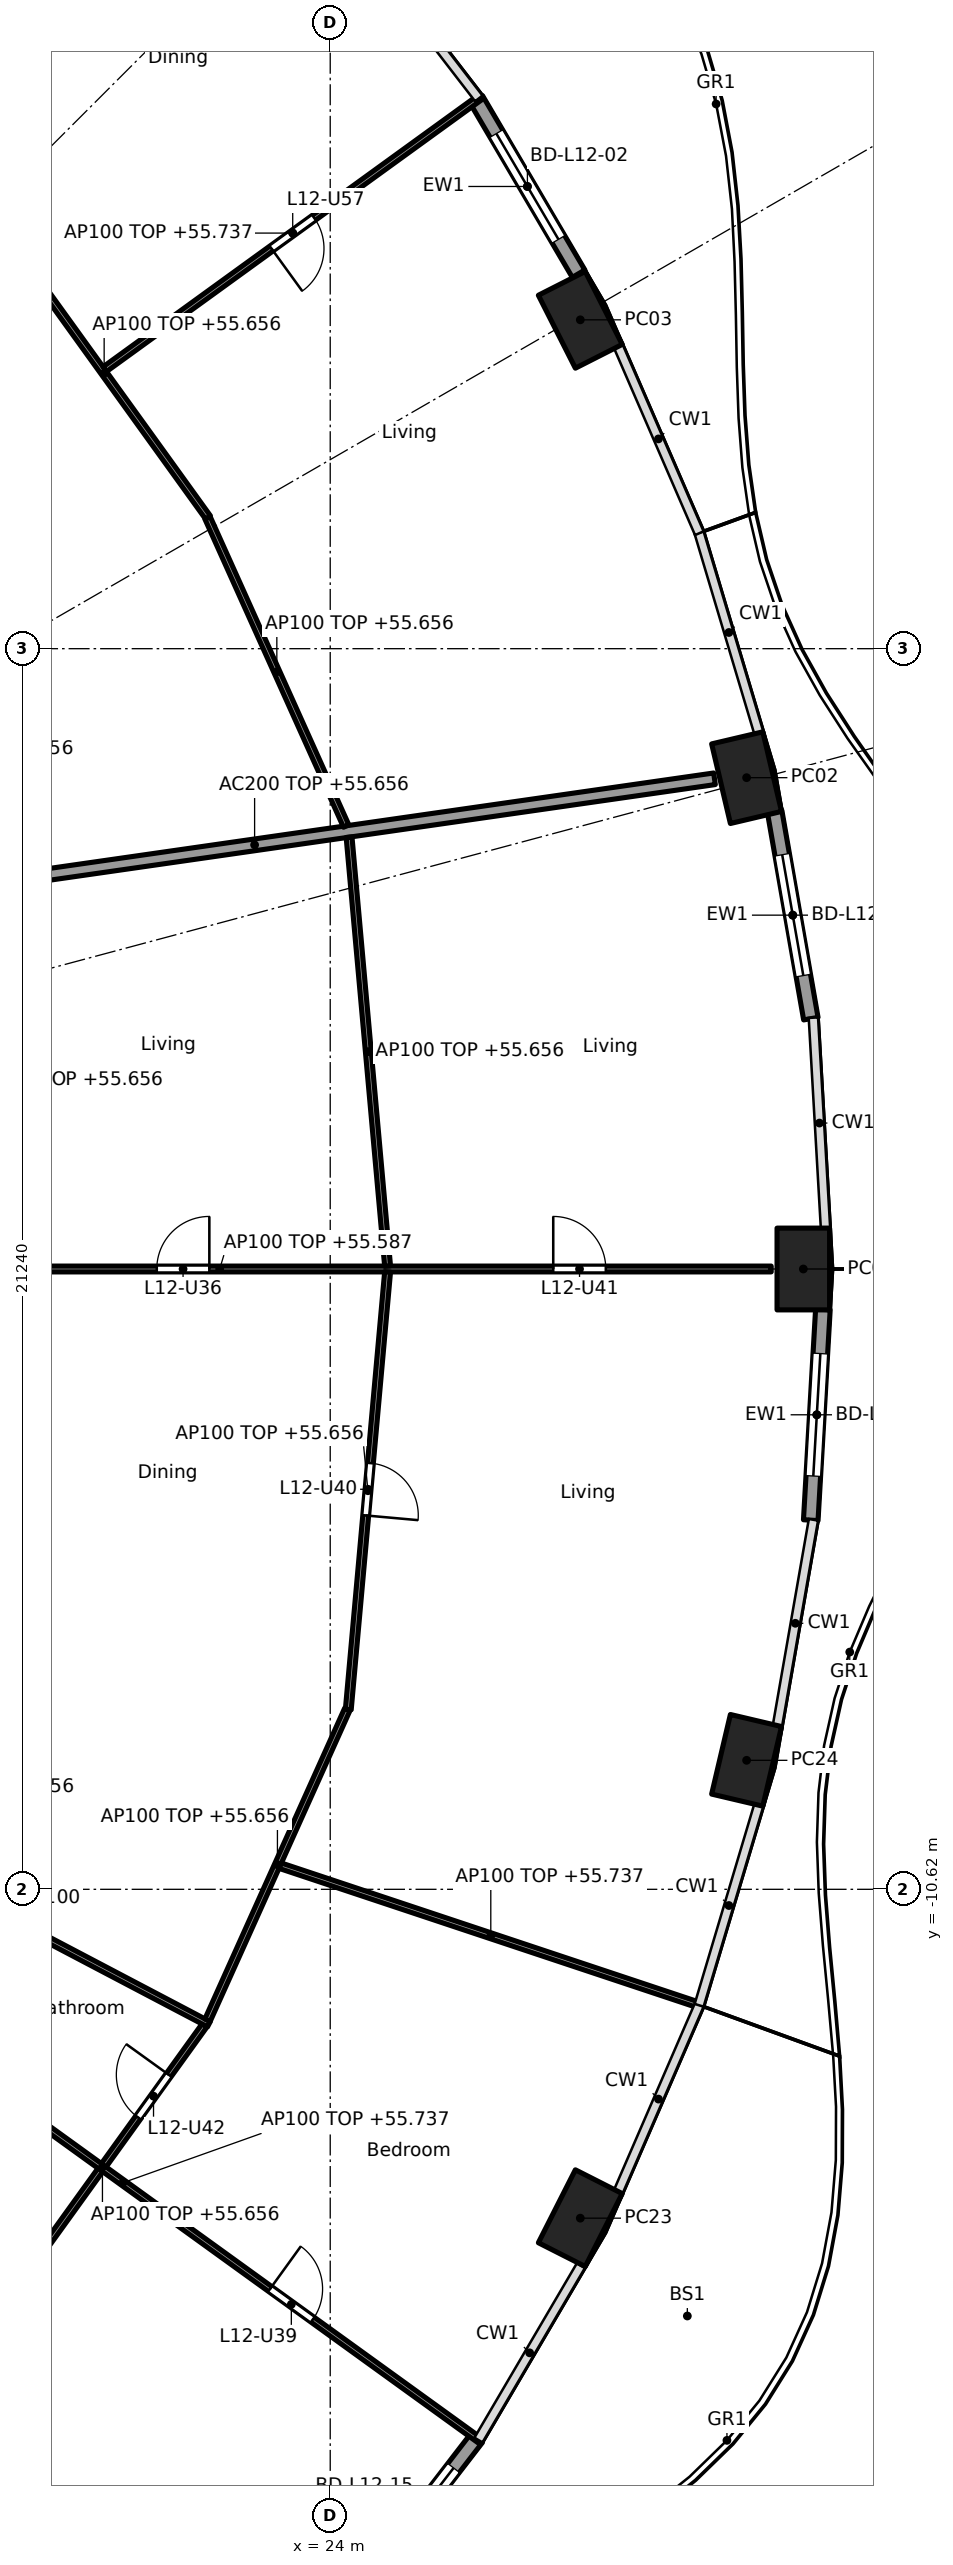
"""IFC4 building model, lengths in metres.
Left out: names, types, materials, properties, quantities, classifications, styles, units other than length and angle.
Written with IfcOpenShell. Run it as: python <this file> out.ifc"""

import sys

from ifc_helpers import new_model, si_unit, direction, frame, frame_2d, origin, origin_2d, place, context, subcontext, project, spatial, rectangle, hollow_rectangle, extrude, element, fill, save


model = new_model("IFC4")
c1 = context("Model", 3, precision=1e-05, world=origin(), true_north=direction((0.0, 1.0)))
c2 = subcontext(c1, "Body", "Model", "MODEL_VIEW")
j1 = project(units=[si_unit("LENGTHUNIT", "METRE"), si_unit("PLANEANGLEUNIT", "RADIAN")], contexts=[c1])
p1 = place(None, origin())
s1 = spatial("IfcSite", under=j1, at=p1, CompositionType="ELEMENT")
p2 = place(p1, origin())
s2 = spatial("IfcBuilding", under=s1, at=p2, CompositionType="ELEMENT")
p3 = place(p2, frame((0.0, 0.0, 52.9)))
s3 = spatial("IfcBuildingStorey", under=s2, at=p3, CompositionType="ELEMENT", Elevation=52.9)
for number, where, z_axis, x_axis in (
    (1, (32.1, 0.0, 0.0), (0.0, 0.0, 1.0), (0.0, 1.0, 0.0)),
    (2, (31.129, 8.412, 0.0), (0.0, 0.0, 1.0), (-0.229, 0.973, 0.0)),
    (3, (28.282, 16.25, 0.0), (0.0, 0.0, 1.0), (-0.452, 0.892, 0.0)),
    (4, (28.282, -16.25, 0.0), (0.0, 0.0, 1.0), (0.452, 0.892, 0.0)),
    (5, (31.129, -8.412, 0.0), (0.0, 0.0, 1.0), (0.229, 0.973, 0.0)),
):
    element("IfcColumn", number, at=place(p3, frame(where, z_axis=z_axis, x_axis=x_axis)), inside=s3, PredefinedType="COLUMN", context=c2, shape_type="SweptSolid", body=[
        extrude(hollow_rectangle(XDim=1.4, YDim=0.9, WallThickness=0.05, at=origin_2d()), origin(), (0.0, 0.0, 1.0), 3.7),
    ])
p4 = place(p3, frame((31.609, 7.83, 0.0), z_axis=(0.0, 0.0, 1.0), x_axis=(0.172217377323, -0.98505897029, 0.0)))
e6 = element("IfcWall", 6, at=p4, inside=s3, PredefinedType="SOLIDWALL", context=c2, shape_type="SweptSolid", body=[
    extrude(rectangle(XDim=3.598, YDim=0.25, at=frame_2d((1.799, 0.0))), origin(), (0.0, 0.0, 1.0), 3.44),
])
p5 = place(p4, frame((0.749, 0.0, 0.0)))
e7 = element("IfcOpeningElement", 7, at=p5, cuts=e6, PredefinedType="OPENING", context=c2, shape_type="SweptSolid", body=[
    extrude(rectangle(XDim=2.1, YDim=2.4, at=frame_2d((1.05, 1.2))), frame((0.0, 0.135, 0.0), z_axis=(0.0, -1.0, 0.0), x_axis=(1.0, 0.0, 0.0)), (0.0, 0.0, 1.0), 0.27),
])
p6 = place(p3, frame((26.5, 20.026, 0.0), z_axis=(0.0, 0.0, 1.0), x_axis=(0.506311160839, -0.862350861546, 0.0)))
e8 = element("IfcWall", 8, at=p6, inside=s3, PredefinedType="SOLIDWALL", context=c2, shape_type="SweptSolid", body=[
    extrude(rectangle(XDim=3.462, YDim=0.25, at=frame_2d((1.731, 0.0))), origin(), (0.0, 0.0, 1.0), 3.44),
])
p7 = place(p6, frame((0.681, 0.0, 0.0)))
e9 = element("IfcOpeningElement", 9, at=p7, cuts=e8, PredefinedType="OPENING", context=c2, shape_type="SweptSolid", body=[
    extrude(rectangle(XDim=2.1, YDim=2.4, at=frame_2d((1.05, 1.2))), frame((0.0, 0.135, 0.0), z_axis=(0.0, -1.0, 0.0), x_axis=(1.0, 0.0, 0.0)), (0.0, 0.0, 1.0), 0.27),
])
p8 = place(p3, frame((26.508, -20.013, 0.0), z_axis=(0.0, 0.0, 1.0), x_axis=(-0.610457147657, -0.792049285635, 0.0)))
e10 = element("IfcWall", 10, at=p8, inside=s3, PredefinedType="SOLIDWALL", context=c2, shape_type="SweptSolid", body=[
    extrude(rectangle(XDim=3.397, YDim=0.25, at=frame_2d((1.699, 0.0))), origin(), (0.0, 0.0, 1.0), 3.44),
])
p9 = place(p8, frame((0.649, 0.0, 0.0)))
e11 = element("IfcOpeningElement", 11, at=p9, cuts=e10, PredefinedType="OPENING", context=c2, shape_type="SweptSolid", body=[
    extrude(rectangle(XDim=2.1, YDim=2.4, at=frame_2d((1.05, 1.2))), frame((0.0, 0.135, 0.0), z_axis=(0.0, -1.0, 0.0), x_axis=(1.0, 0.0, 0.0)), (0.0, 0.0, 1.0), 0.27),
])
p10 = place(p3, frame((32.435, -0.692, 0.0), z_axis=(0.0, 0.0, 1.0), x_axis=(-0.057546046339, -0.998342853208, 0.0)))
e12 = element("IfcWall", 12, at=p10, inside=s3, PredefinedType="SOLIDWALL", context=c2, shape_type="SweptSolid", body=[
    extrude(rectangle(XDim=3.615, YDim=0.25, at=frame_2d((1.807, 0.0))), origin(), (0.0, 0.0, 1.0), 3.44),
])
p11 = place(p10, frame((0.757, 0.0, 0.0)))
e13 = element("IfcOpeningElement", 13, at=p11, cuts=e12, PredefinedType="OPENING", context=c2, shape_type="SweptSolid", body=[
    extrude(rectangle(XDim=2.1, YDim=2.4, at=frame_2d((1.05, 1.2))), frame((0.0, 0.135, 0.0), z_axis=(0.0, -1.0, 0.0), x_axis=(1.0, 0.0, 0.0)), (0.0, 0.0, 1.0), 0.27),
])
p12 = place(p3, frame((14.832, 6.13, 0.0), z_axis=(0.0, 0.0, 1.0), x_axis=(0.989836541293, 0.142209779978, 0.0)))
e14 = element("IfcWall", 14, at=p12, inside=s3, PredefinedType="PARTITIONING", context=c2, shape_type="SweptSolid", body=[
    extrude(rectangle(XDim=15.909, YDim=0.2, at=frame_2d((7.955, 0.0))), origin(), (0.0, 0.0, 1.0), 2.756),
])
p13 = place(p3, frame((12.665, 0.0, 0.0), z_axis=(0.0, 0.0, 1.0), x_axis=(1.0, 0.0, 0.0)))
e15 = element("IfcWall", 15, at=p13, inside=s3, PredefinedType="PARTITIONING", context=c2, shape_type="SweptSolid", body=[
    extrude(rectangle(XDim=18.885, YDim=0.1, at=frame_2d((9.443, 0.0))), origin(), (0.0, 0.0, 1.0), 2.687),
])
p14 = place(p13, frame((2.205, 0.0, 0.0)))
e16 = element("IfcOpeningElement", 16, at=p14, cuts=e15, PredefinedType="OPENING", context=c2, shape_type="SweptSolid", body=[
    extrude(rectangle(XDim=0.9, YDim=2.1, at=frame_2d((0.45, 1.05))), frame((0.0, 0.06, 0.0), z_axis=(0.0, -1.0, 0.0), x_axis=(1.0, 0.0, 0.0)), (0.0, 0.0, 1.0), 0.12),
])
p15 = place(p13, frame((8.366, 0.0, 0.0)))
e17 = element("IfcOpeningElement", 17, at=p15, cuts=e15, PredefinedType="OPENING", context=c2, shape_type="SweptSolid", body=[
    extrude(rectangle(XDim=0.9, YDim=2.1, at=frame_2d((0.45, 1.05))), frame((0.0, 0.06, 0.0), z_axis=(0.0, -1.0, 0.0), x_axis=(1.0, 0.0, 0.0)), (0.0, 0.0, 1.0), 0.12),
])
p16 = place(p13, frame((15.154, 0.0, 0.0)))
e18 = element("IfcOpeningElement", 18, at=p16, cuts=e15, PredefinedType="OPENING", context=c2, shape_type="SweptSolid", body=[
    extrude(rectangle(XDim=0.9, YDim=2.1, at=frame_2d((0.45, 1.05))), frame((0.0, 0.06, 0.0), z_axis=(0.0, -1.0, 0.0), x_axis=(1.0, 0.0, 0.0)), (0.0, 0.0, 1.0), 0.12),
])
p17 = place(p3, frame((24.982, 0.05, 0.0), z_axis=(0.0, 0.0, 1.0), x_axis=(-0.08944290521, 0.995991951126, 0.0)))
e19 = element("IfcWall", 19, at=p17, inside=s3, PredefinedType="PARTITIONING", context=c2, shape_type="SweptSolid", body=[
    extrude(rectangle(XDim=7.373, YDim=0.1, at=frame_2d((3.686, 0.0))), origin(), (0.0, 0.0, 1.0), 2.756),
])
p18 = place(p3, frame((24.982, -0.05, 0.0), z_axis=(0.0, 0.0, 1.0), x_axis=(-0.089444214321, -0.995991833563, 0.0)))
e20 = element("IfcWall", 20, at=p18, inside=s3, PredefinedType="PARTITIONING", context=c2, shape_type="SweptSolid", body=[
    extrude(rectangle(XDim=7.523, YDim=0.1, at=frame_2d((3.761, 0.0))), origin(), (0.0, 0.0, 1.0), 2.756),
])
p19 = place(p18, frame((3.286, 0.0, 0.0)))
e21 = element("IfcOpeningElement", 21, at=p19, cuts=e20, PredefinedType="OPENING", context=c2, shape_type="SweptSolid", body=[
    extrude(rectangle(XDim=0.9, YDim=2.1, at=frame_2d((0.45, 1.05))), frame((0.0, 0.06, 0.0), z_axis=(0.0, -1.0, 0.0), x_axis=(1.0, 0.0, 0.0)), (0.0, 0.0, 1.0), 0.12),
])
p20 = place(p3, frame((24.273, 7.584, 0.0), z_axis=(0.0, 0.0, 1.0), x_axis=(-0.410201529109, 0.911994904326, 0.0)))
e22 = element("IfcWall", 22, at=p20, inside=s3, PredefinedType="PARTITIONING", context=c2, shape_type="SweptSolid", body=[
    extrude(rectangle(XDim=5.787, YDim=0.1, at=frame_2d((2.894, 0.0))), origin(), (0.0, 0.0, 1.0), 2.756),
])
p21 = place(p3, frame((21.908, 12.866, 0.0), z_axis=(0.0, 0.0, 1.0), x_axis=(-0.584558392935, 0.811351640936, 0.0)))
e23 = element("IfcWall", 23, at=p21, inside=s3, PredefinedType="PARTITIONING", context=c2, shape_type="SweptSolid", body=[
    extrude(rectangle(XDim=6.084, YDim=0.1, at=frame_2d((3.042, 0.0))), origin(), (0.0, 0.0, 1.0), 2.756),
])
p22 = place(p3, frame((20.141, 15.405, 0.0), z_axis=(0.0, 0.0, 1.0), x_axis=(0.809834895779, 0.58665785734, 0.0)))
e24 = element("IfcWall", 24, at=p22, inside=s3, PredefinedType="PARTITIONING", context=c2, shape_type="SweptSolid", body=[
    extrude(rectangle(XDim=7.945, YDim=0.1, at=frame_2d((3.973, 0.0))), origin(), (0.0, 0.0, 1.0), 2.837),
])
p23 = place(p22, frame((3.522, 0.0, 0.0)))
e25 = element("IfcOpeningElement", 25, at=p23, cuts=e24, PredefinedType="OPENING", context=c2, shape_type="SweptSolid", body=[
    extrude(rectangle(XDim=0.9, YDim=2.1, at=frame_2d((0.45, 1.05))), frame((0.0, 0.06, 0.0), z_axis=(0.0, -1.0, 0.0), x_axis=(1.0, 0.0, 0.0)), (0.0, 0.0, 1.0), 0.12),
])
p24 = place(p3, frame((16.142, 19.858, 0.0), z_axis=(0.0, 0.0, 1.0), x_axis=(0.628738066508, 0.777617157555, 0.0)))
e26 = element("IfcWall", 26, at=p24, inside=s3, PredefinedType="PARTITIONING", context=c2, shape_type="SweptSolid", body=[
    extrude(rectangle(XDim=8.091, YDim=0.1, at=frame_2d((4.045, 0.0))), origin(), (0.0, 0.0, 1.0), 2.837),
])
p25 = place(p24, frame((3.595, 0.0, 0.0)))
e27 = element("IfcOpeningElement", 27, at=p25, cuts=e26, PredefinedType="OPENING", context=c2, shape_type="SweptSolid", body=[
    extrude(rectangle(XDim=0.9, YDim=2.1, at=frame_2d((0.45, 1.05))), frame((0.0, 0.06, 0.0), z_axis=(0.0, -1.0, 0.0), x_axis=(1.0, 0.0, 0.0)), (0.0, 0.0, 1.0), 0.12),
])
p26 = place(p3, frame((18.351, -17.803, 0.0), z_axis=(0.0, 0.0, 1.0), x_axis=(0.584563700282, 0.811347817099, 0.0)))
e28 = element("IfcWall", 28, at=p26, inside=s3, PredefinedType="PARTITIONING", context=c2, shape_type="SweptSolid", body=[
    extrude(rectangle(XDim=5.984, YDim=0.1, at=frame_2d((2.992, 0.0))), origin(), (0.0, 0.0, 1.0), 2.756),
])
p27 = place(p26, frame((4.038, 0.0, 0.0)))
e29 = element("IfcOpeningElement", 29, at=p27, cuts=e28, PredefinedType="OPENING", context=c2, shape_type="SweptSolid", body=[
    extrude(rectangle(XDim=0.9, YDim=2.1, at=frame_2d((0.45, 1.05))), frame((0.0, 0.06, 0.0), z_axis=(0.0, -1.0, 0.0), x_axis=(1.0, 0.0, 0.0)), (0.0, 0.0, 1.0), 0.12),
])
p28 = place(p3, frame((14.329, -11.221, 0.0), z_axis=(0.0, 0.0, 1.0), x_axis=(0.810671130917, -0.58550176558, 0.0)))
e30 = element("IfcWall", 30, at=p28, inside=s3, PredefinedType="PARTITIONING", context=c2, shape_type="SweptSolid", body=[
    extrude(rectangle(XDim=15.106, YDim=0.1, at=frame_2d((7.553, 0.0))), origin(), (0.0, 0.0, 1.0), 2.837),
])
p29 = place(p28, frame((10.659, 0.0, 0.0)))
e31 = element("IfcOpeningElement", 31, at=p29, cuts=e30, PredefinedType="OPENING", context=c2, shape_type="SweptSolid", body=[
    extrude(rectangle(XDim=0.9, YDim=2.1, at=frame_2d((0.45, 1.05))), frame((0.0, 0.06, 0.0), z_axis=(0.0, -1.0, 0.0), x_axis=(1.0, 0.0, 0.0)), (0.0, 0.0, 1.0), 0.12),
])
p30 = place(p3, frame((15.538, -9.574, 0.0), z_axis=(0.0, 0.0, 1.0), x_axis=(0.88517945493, -0.465249752895, 0.0)))
e32 = element("IfcWall", 32, at=p30, inside=s3, PredefinedType="PARTITIONING", context=c2, shape_type="SweptSolid", body=[
    extrude(rectangle(XDim=7.213, YDim=0.1, at=frame_2d((3.606, 0.0))), origin(), (0.0, 0.0, 1.0), 3.44),
])
p31 = place(p3, frame((21.899, -12.861, 0.0), z_axis=(0.0, 0.0, 1.0), x_axis=(0.410197710154, 0.911996622025, 0.0)))
e33 = element("IfcWall", 33, at=p31, inside=s3, PredefinedType="PARTITIONING", context=c2, shape_type="SweptSolid", body=[
    extrude(rectangle(XDim=5.837, YDim=0.1, at=frame_2d((2.918, 0.0))), origin(), (0.0, 0.0, 1.0), 2.756),
])
p32 = place(p3, frame((23.144, -10.216, 0.0), z_axis=(0.0, 0.0, 1.0), x_axis=(0.948811715359, -0.315842253027, 0.0)))
e34 = element("IfcWall", 34, at=p32, inside=s3, PredefinedType="PARTITIONING", context=c2, shape_type="SweptSolid", body=[
    extrude(rectangle(XDim=7.6, YDim=0.1, at=frame_2d((3.8, 0.0))), origin(), (0.0, 0.0, 1.0), 2.837),
])
p33 = place(p5, origin())
e35 = element("IfcDoor", 35, at=p33, inside=s3, OperationType="SLIDING_TO_LEFT", PredefinedType="DOOR", context=c2, shape_type="SweptSolid", body=[
    extrude(rectangle(XDim=2.1, YDim=2.4, at=frame_2d((1.05, 1.2))), frame((0.0, 0.025, 0.0), z_axis=(0.0, -1.0, 0.0), x_axis=(1.0, 0.0, 0.0)), (0.0, 0.0, 1.0), 0.05),
])
fill(e7, e35)
p34 = place(p7, origin())
e36 = element("IfcDoor", 36, at=p34, inside=s3, OperationType="SLIDING_TO_LEFT", PredefinedType="DOOR", context=c2, shape_type="SweptSolid", body=[
    extrude(rectangle(XDim=2.1, YDim=2.4, at=frame_2d((1.05, 1.2))), frame((0.0, 0.025, 0.0), z_axis=(0.0, -1.0, 0.0), x_axis=(1.0, 0.0, 0.0)), (0.0, 0.0, 1.0), 0.05),
])
fill(e9, e36)
p35 = place(p9, origin())
e37 = element("IfcDoor", 37, at=p35, inside=s3, OperationType="SLIDING_TO_LEFT", PredefinedType="DOOR", context=c2, shape_type="SweptSolid", body=[
    extrude(rectangle(XDim=2.1, YDim=2.4, at=frame_2d((1.05, 1.2))), frame((0.0, 0.025, 0.0), z_axis=(0.0, -1.0, 0.0), x_axis=(1.0, 0.0, 0.0)), (0.0, 0.0, 1.0), 0.05),
])
fill(e11, e37)
p36 = place(p11, origin())
e38 = element("IfcDoor", 38, at=p36, inside=s3, OperationType="SLIDING_TO_LEFT", PredefinedType="DOOR", context=c2, shape_type="SweptSolid", body=[
    extrude(rectangle(XDim=2.1, YDim=2.4, at=frame_2d((1.05, 1.2))), frame((0.0, 0.025, 0.0), z_axis=(0.0, -1.0, 0.0), x_axis=(1.0, 0.0, 0.0)), (0.0, 0.0, 1.0), 0.05),
])
fill(e13, e38)
p37 = place(p15, origin())
e39 = element("IfcDoor", 39, at=p37, inside=s3, OperationType="SINGLE_SWING_RIGHT", PredefinedType="DOOR", context=c2, shape_type="SweptSolid", body=[
    extrude(rectangle(XDim=0.9, YDim=2.1, at=frame_2d((0.45, 1.05))), frame((0.0, 0.025, 0.0), z_axis=(0.0, -1.0, 0.0), x_axis=(1.0, 0.0, 0.0)), (0.0, 0.0, 1.0), 0.05),
])
fill(e17, e39)
p38 = place(p29, origin())
e40 = element("IfcDoor", 40, at=p38, inside=s3, OperationType="SINGLE_SWING_LEFT", PredefinedType="DOOR", context=c2, shape_type="SweptSolid", body=[
    extrude(rectangle(XDim=0.9, YDim=2.1, at=frame_2d((0.45, 1.05))), frame((0.0, 0.025, 0.0), z_axis=(0.0, -1.0, 0.0), x_axis=(1.0, 0.0, 0.0)), (0.0, 0.0, 1.0), 0.05),
])
fill(e31, e40)
p39 = place(p19, origin())
e41 = element("IfcDoor", 41, at=p39, inside=s3, OperationType="SINGLE_SWING_RIGHT", PredefinedType="DOOR", context=c2, shape_type="SweptSolid", body=[
    extrude(rectangle(XDim=0.9, YDim=2.1, at=frame_2d((0.45, 1.05))), frame((0.0, 0.025, 0.0), z_axis=(0.0, -1.0, 0.0), x_axis=(1.0, 0.0, 0.0)), (0.0, 0.0, 1.0), 0.05),
])
fill(e21, e41)
p40 = place(p16, origin())
e42 = element("IfcDoor", 42, at=p40, inside=s3, OperationType="SINGLE_SWING_LEFT", PredefinedType="DOOR", context=c2, shape_type="SweptSolid", body=[
    extrude(rectangle(XDim=0.9, YDim=2.1, at=frame_2d((0.45, 1.05))), frame((0.0, 0.025, 0.0), z_axis=(0.0, -1.0, 0.0), x_axis=(1.0, 0.0, 0.0)), (0.0, 0.0, 1.0), 0.05),
])
fill(e18, e42)
p41 = place(p27, origin())
e43 = element("IfcDoor", 43, at=p41, inside=s3, OperationType="SINGLE_SWING_RIGHT", PredefinedType="DOOR", context=c2, shape_type="SweptSolid", body=[
    extrude(rectangle(XDim=0.9, YDim=2.1, at=frame_2d((0.45, 1.05))), frame((0.0, 0.025, 0.0), z_axis=(0.0, -1.0, 0.0), x_axis=(1.0, 0.0, 0.0)), (0.0, 0.0, 1.0), 0.05),
])
fill(e29, e43)
p42 = place(p23, frame((0.9, 0.0, 0.0), x_axis=(-1.0, 0.0, 0.0)))
e44 = element("IfcDoor", 44, at=p42, inside=s3, OperationType="SINGLE_SWING_RIGHT", PredefinedType="DOOR", context=c2, shape_type="SweptSolid", body=[
    extrude(rectangle(XDim=0.9, YDim=2.1, at=frame_2d((0.45, 1.05))), frame((0.0, 0.025, 0.0), z_axis=(0.0, -1.0, 0.0), x_axis=(1.0, 0.0, 0.0)), (0.0, 0.0, 1.0), 0.05),
])
fill(e25, e44)
save(model, sys.argv[1])
